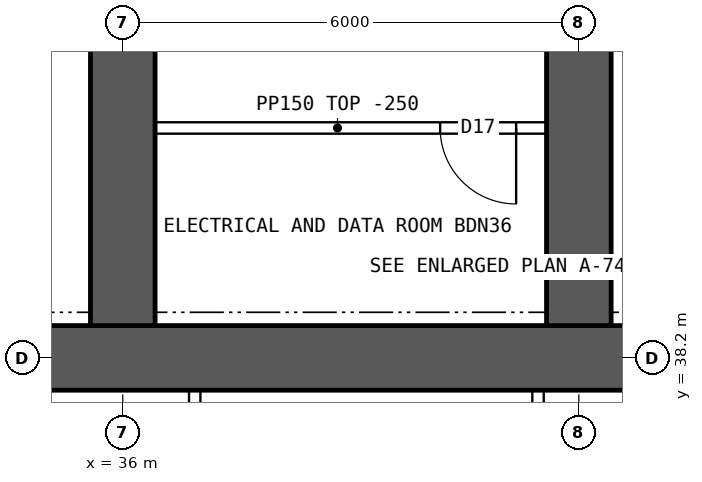
"""IFC4 building model, lengths in metres.
Left out: names, types, materials, properties, quantities, classifications, styles, units other than length and angle.
Written with IfcOpenShell. Run it as: python <this file> out.ifc"""

import sys

from ifc_helpers import new_model, si_unit, direction, frame, frame_2d, origin, place, context, subcontext, project, spatial, rectangle, extrude, element, fill, save


model = new_model("IFC4")
c1 = context("Model", 3, precision=1e-05, world=origin(), true_north=direction((0.0, 1.0)))
c2 = subcontext(c1, "Body", "Model", "MODEL_VIEW")
j1 = project(units=[si_unit("LENGTHUNIT", "METRE"), si_unit("PLANEANGLEUNIT", "RADIAN")], contexts=[c1])
p1 = place(None, origin())
s1 = spatial("IfcSite", under=j1, at=p1, CompositionType="ELEMENT")
p2 = place(p1, origin())
s2 = spatial("IfcBuilding", under=s1, at=p2, CompositionType="ELEMENT")
p3 = place(p2, frame((0.0, 0.0, 186.1)))
s3 = spatial("IfcBuildingStorey", under=s2, at=p3, CompositionType="ELEMENT", Elevation=186.1)
p4 = place(p3, frame((18.0, 38.2, 0.0), z_axis=(0.0, 0.0, 1.0), x_axis=(1.0, 0.0, 0.0)))
e1 = element("IfcWall", 1, at=p4, inside=s3, PredefinedType="SHEAR", context=c2, shape_type="SweptSolid", body=[
    extrude(rectangle(XDim=48.0, YDim=0.85, at=frame_2d((24.0, 0.0))), origin(), (0.0, 0.0, 1.0), 3.75),
])
for number, where, z_axis, x_axis in (
    (2, (36.0, 38.625, 0.0), (0.0, 0.0, 1.0), (0.0, 1.0, 0.0)),
    (3, (42.0, 38.625, 0.0), (0.0, 0.0, 1.0), (0.0, 1.0, 0.0)),
):
    element("IfcWall", number, at=place(p3, frame(where, z_axis=z_axis, x_axis=x_axis)), inside=s3, PredefinedType="SHEAR", context=c2, shape_type="SweptSolid", body=[
        extrude(rectangle(XDim=8.175, YDim=0.85, at=frame_2d((4.087, 0.0))), origin(), (0.0, 0.0, 1.0), 3.75),
    ])
for number, where, z_axis, x_axis in (
    (4, (36.946, 34.75, 0.0), (0.0, 0.0, 1.0), (0.0, 1.0, 0.0)),
    (5, (41.463, 34.75, 0.0), (0.0, 0.0, 1.0), (0.0, 1.0, 0.0)),
):
    element("IfcWall", number, at=place(p3, frame(where, z_axis=z_axis, x_axis=x_axis)), inside=s3, PredefinedType="SOLIDWALL", context=c2, shape_type="SweptSolid", body=[
        extrude(rectangle(XDim=3.025, YDim=0.15, at=frame_2d((1.512, 0.0))), origin(), (0.0, 0.0, 1.0), 3.5),
    ])
p5 = place(p3, frame((41.575, 41.225, 0.0), z_axis=(0.0, 0.0, 1.0), x_axis=(-1.0, 0.0, 0.0)))
e6 = element("IfcWall", 6, at=p5, inside=s3, PredefinedType="PARTITIONING", context=c2, shape_type="SweptSolid", body=[
    extrude(rectangle(XDim=5.5, YDim=0.15, at=frame_2d((2.75, 0.0))), origin(), (0.0, 0.0, 1.0), 3.5),
])
p6 = place(p5, frame((0.4, 0.0, 0.0)))
e7 = element("IfcOpeningElement", 7, at=p6, cuts=e6, PredefinedType="OPENING", context=c2, shape_type="SweptSolid", body=[
    extrude(rectangle(XDim=1.0, YDim=2.1, at=frame_2d((0.5, 1.05))), frame((0.0, 0.085, 0.0), z_axis=(0.0, -1.0, 0.0), x_axis=(1.0, 0.0, 0.0)), (0.0, 0.0, 1.0), 0.17),
])
p7 = place(p6, origin())
e8 = element("IfcDoor", 8, at=p7, inside=s3, OperationType="SINGLE_SWING_LEFT", PredefinedType="DOOR", context=c2, shape_type="SweptSolid", body=[
    extrude(rectangle(XDim=1.0, YDim=2.1, at=frame_2d((0.5, 1.05))), frame((0.0, 0.025, 0.0), z_axis=(0.0, -1.0, 0.0), x_axis=(1.0, 0.0, 0.0)), (0.0, 0.0, 1.0), 0.05),
])
fill(e7, e8)
save(model, sys.argv[1])
